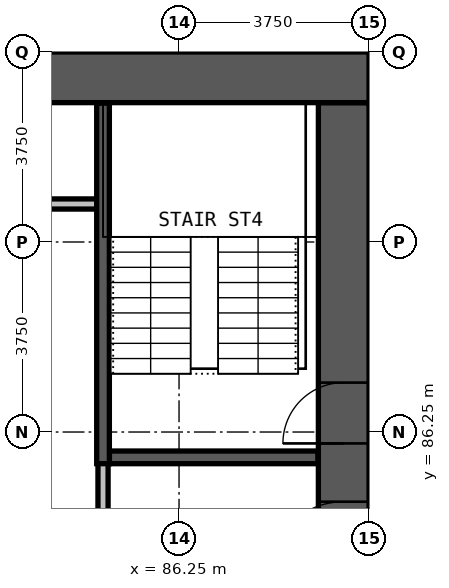
"""IFC4 building model, lengths in metres.
Left out: names, types, materials, properties, quantities, classifications, styles, units other than length and angle.
Written with IfcOpenShell. Run it as: python <this file> out.ifc"""

import sys

from ifc_helpers import new_model, si_unit, direction, frame, frame_2d, origin, place, context, subcontext, project, spatial, rectangle, extrude, element, fill, save


model = new_model("IFC4")
c1 = context("Model", 3, precision=1e-05, world=origin(), true_north=direction((0.0, 1.0)))
c2 = subcontext(c1, "Body", "Model", "MODEL_VIEW")
j1 = project(units=[si_unit("LENGTHUNIT", "METRE"), si_unit("PLANEANGLEUNIT", "RADIAN")], contexts=[c1])
p1 = place(None, origin())
s1 = spatial("IfcSite", under=j1, at=p1, CompositionType="ELEMENT")
p2 = place(p1, origin())
s2 = spatial("IfcBuilding", under=s1, at=p2, CompositionType="ELEMENT")
p3 = place(p2, frame((0.0, 0.0, 59.3)))
s3 = spatial("IfcBuildingStorey", under=s2, at=p3, CompositionType="ELEMENT", Elevation=59.3)
p4 = place(p3, frame((89.5, 72.25, 0.0), z_axis=(0.0, 0.0, 1.0), x_axis=(0.0, 1.0, 0.0)))
e1 = element("IfcWall", 1, at=p4, inside=s3, PredefinedType="SHEAR", context=c2, shape_type="SweptSolid", body=[
    extrude(rectangle(XDim=20.5, YDim=1.0, at=frame_2d((10.25, 0.0))), origin(), (0.0, 0.0, 1.0), 3.3),
])
p5 = place(p4, frame((0.275, 0.0, 0.0)))
e2 = element("IfcOpeningElement", 2, at=p5, cuts=e1, PredefinedType="OPENING", context=c2, shape_type="SweptSolid", body=[
    extrude(rectangle(XDim=1.2, YDim=2.2, at=frame_2d((0.6, 1.1))), frame((0.0, 0.51, 0.0), z_axis=(0.0, -1.0, 0.0), x_axis=(1.0, 0.0, 0.0)), (0.0, 0.0, 1.0), 1.02),
])
p6 = place(p4, frame((13.775, 0.0, 0.0)))
e3 = element("IfcOpeningElement", 3, at=p6, cuts=e1, PredefinedType="OPENING", context=c2, shape_type="SweptSolid", body=[
    extrude(rectangle(XDim=1.2, YDim=2.2, at=frame_2d((0.6, 1.1))), frame((0.0, 0.51, 0.0), z_axis=(0.0, -1.0, 0.0), x_axis=(1.0, 0.0, 0.0)), (0.0, 0.0, 1.0), 1.02),
])
p7 = place(p4, frame((7.875, 0.0, 0.0)))
e4 = element("IfcOpeningElement", 4, at=p7, cuts=e1, PredefinedType="OPENING", context=c2, shape_type="SweptSolid", body=[
    extrude(rectangle(XDim=1.5, YDim=2.2, at=frame_2d((0.75, 1.1))), frame((0.0, 0.51, 0.0), z_axis=(0.0, -1.0, 0.0), x_axis=(1.0, 0.0, 0.0)), (0.0, 0.0, 1.0), 1.02),
])
p8 = place(p4, frame((11.125, 0.0, 0.0)))
e5 = element("IfcOpeningElement", 5, at=p8, cuts=e1, PredefinedType="OPENING", context=c2, shape_type="SweptSolid", body=[
    extrude(rectangle(XDim=1.5, YDim=2.2, at=frame_2d((0.75, 1.1))), frame((0.0, 0.51, 0.0), z_axis=(0.0, -1.0, 0.0), x_axis=(1.0, 0.0, 0.0)), (0.0, 0.0, 1.0), 1.02),
])
p9 = place(p3, frame((90.0, 93.25, 0.0), z_axis=(0.0, 0.0, 1.0), x_axis=(-1.0, 0.0, 0.0)))
e6 = element("IfcWall", 6, at=p9, inside=s3, PredefinedType="SHEAR", context=c2, shape_type="SweptSolid", body=[
    extrude(rectangle(XDim=30.0, YDim=1.0, at=frame_2d((15.0, 0.0))), origin(), (0.0, 0.0, 1.0), 3.3),
])
p10 = place(p3, frame((75.26, 90.75, 0.0), z_axis=(0.0, 0.0, 1.0), x_axis=(1.0, 0.0, 0.0)))
e7 = element("IfcWall", 7, at=p10, inside=s3, PredefinedType="PARTITIONING", context=c2, shape_type="SweptSolid", body=[
    extrude(rectangle(XDim=9.365, YDim=0.2, at=frame_2d((4.683, 0.0))), origin(), (0.0, 0.0, 1.0), 3.0),
])
p11 = place(p3, frame((84.75, 84.4, 0.0), z_axis=(0.0, 0.0, 1.0), x_axis=(0.0, 1.0, 0.0)))
e8 = element("IfcWall", 8, at=p11, inside=s3, PredefinedType="PARTITIONING", context=c2, shape_type="SweptSolid", body=[
    extrude(rectangle(XDim=1.475, YDim=0.2, at=frame_2d((0.738, 0.0))), origin(), (0.0, 0.0, 1.0), 3.0),
])
p12 = place(p3, frame((84.875, 85.75, 0.0), z_axis=(0.0, 0.0, 1.0), x_axis=(1.0, 0.0, 0.0)))
e9 = element("IfcWall", 9, at=p12, inside=s3, PredefinedType="PARTITIONING", context=c2, shape_type="SweptSolid", body=[
    extrude(rectangle(XDim=4.115, YDim=0.25, at=frame_2d((2.058, 0.0))), origin(), (0.0, 0.0, 1.0), 3.0),
])
p13 = place(p3, frame((84.75, 85.625, 0.0), z_axis=(0.0, 0.0, 1.0), x_axis=(0.0, 1.0, 0.0)))
e10 = element("IfcWall", 10, at=p13, inside=s3, PredefinedType="PARTITIONING", context=c2, shape_type="SweptSolid", body=[
    extrude(rectangle(XDim=7.115, YDim=0.25, at=frame_2d((3.558, 0.0))), origin(), (0.0, 0.0, 1.0), 3.0),
])
p14 = place(p6, origin())
e11 = element("IfcDoor", 11, at=p14, inside=s3, OperationType="SINGLE_SWING_LEFT", PredefinedType="DOOR", context=c2, shape_type="SweptSolid", body=[
    extrude(rectangle(XDim=1.2, YDim=2.2, at=frame_2d((0.6, 1.1))), frame((0.0, 0.025, 0.0), z_axis=(0.0, -1.0, 0.0), x_axis=(1.0, 0.0, 0.0)), (0.0, 0.0, 1.0), 0.05),
])
fill(e3, e11)
p15 = place(p8, origin())
e12 = element("IfcDoor", 12, at=p15, inside=s3, OperationType="DOUBLE_DOOR_SINGLE_SWING", PredefinedType="DOOR", context=c2, shape_type="SweptSolid", body=[
    extrude(rectangle(XDim=1.5, YDim=2.2, at=frame_2d((0.75, 1.1))), frame((0.0, 0.025, 0.0), z_axis=(0.0, -1.0, 0.0), x_axis=(1.0, 0.0, 0.0)), (0.0, 0.0, 1.0), 0.05),
])
fill(e5, e12)
save(model, sys.argv[1])
